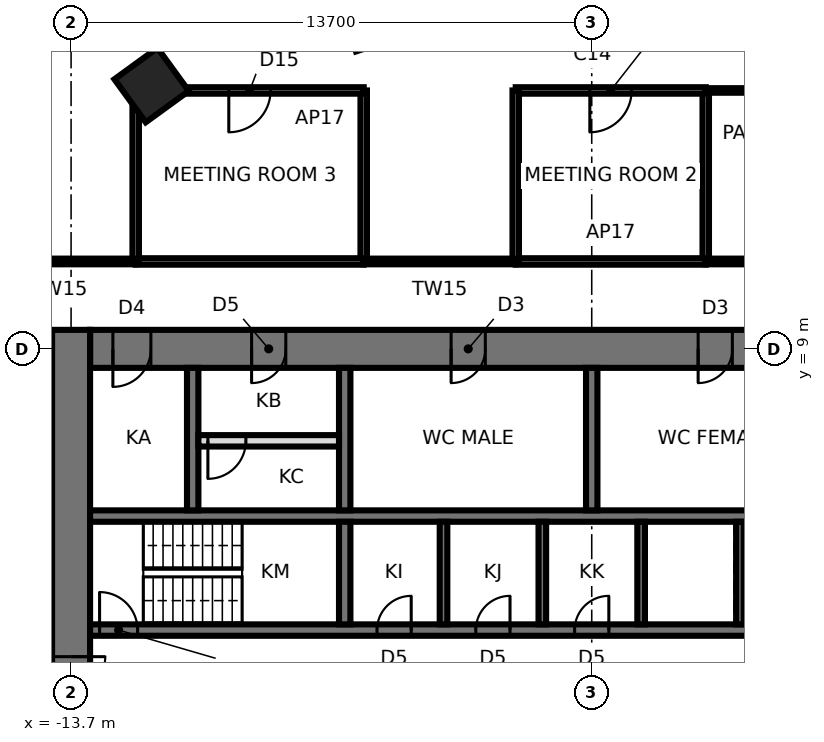
"""IFC4 building model, lengths in metres.
Left out: names, types, materials, properties, quantities, classifications, styles, units other than length and angle.
Written with IfcOpenShell. Run it as: python <this file> out.ifc"""

import sys

from ifc_helpers import new_model, si_unit, direction, frame, frame_2d, origin, origin_2d, place, context, subcontext, project, spatial, rectangle, extrude, element, fill, save


model = new_model("IFC4")
c1 = context("Model", 3, precision=1e-05, world=origin(), true_north=direction((0.0, 1.0)))
c2 = subcontext(c1, "Body", "Model", "MODEL_VIEW")
j1 = project(units=[si_unit("LENGTHUNIT", "METRE"), si_unit("PLANEANGLEUNIT", "RADIAN")], contexts=[c1])
p1 = place(None, origin())
s1 = spatial("IfcSite", under=j1, at=p1, CompositionType="ELEMENT")
p2 = place(p1, origin())
s2 = spatial("IfcBuilding", under=s1, at=p2, CompositionType="ELEMENT")
p3 = place(p2, frame((0.0, 0.0, 195.5)))
s3 = spatial("IfcBuildingStorey", under=s2, at=p3, CompositionType="ELEMENT", Elevation=195.5)
p4 = place(p3, frame((-11.581, 15.94, 0.0), z_axis=(0.0, 0.0, 1.0), x_axis=(-0.587785252292, 0.809016994375, 0.0)))
e1 = element("IfcColumn", 1, at=p4, inside=s3, PredefinedType="COLUMN", context=c2, shape_type="SweptSolid", body=[
    extrude(rectangle(XDim=1.4, YDim=1.4, at=origin_2d()), origin(), (0.0, 0.0, 1.0), 3.9),
])
p5 = place(p3, frame((13.2, 9.0, 0.0), z_axis=(0.0, 0.0, 1.0), x_axis=(-1.0, 0.0, 0.0)))
e2 = element("IfcWall", 2, at=p5, inside=s3, PredefinedType="SHEAR", context=c2, shape_type="SweptSolid", body=[
    extrude(rectangle(XDim=26.4, YDim=1.0, at=frame_2d((13.2, 0.0))), origin(), (0.0, 0.0, 1.0), 3.9),
])
p6 = place(p5, frame((2.65, 0.0, 0.0)))
e3 = element("IfcOpeningElement", 3, at=p6, cuts=e2, PredefinedType="OPENING", context=c2, shape_type="SweptSolid", body=[
    extrude(rectangle(XDim=0.9, YDim=2.1, at=frame_2d((0.45, 1.05))), frame((0.0, 0.51, 0.0), z_axis=(0.0, -1.0, 0.0), x_axis=(1.0, 0.0, 0.0)), (0.0, 0.0, 1.0), 1.02),
])
p7 = place(p5, frame((9.5, 0.0, 0.0)))
e4 = element("IfcOpeningElement", 4, at=p7, cuts=e2, PredefinedType="OPENING", context=c2, shape_type="SweptSolid", body=[
    extrude(rectangle(XDim=0.9, YDim=2.1, at=frame_2d((0.45, 1.05))), frame((0.0, 0.51, 0.0), z_axis=(0.0, -1.0, 0.0), x_axis=(1.0, 0.0, 0.0)), (0.0, 0.0, 1.0), 1.02),
])
p8 = place(p5, frame((16.0, 0.0, 0.0)))
e5 = element("IfcOpeningElement", 5, at=p8, cuts=e2, PredefinedType="OPENING", context=c2, shape_type="SweptSolid", body=[
    extrude(rectangle(XDim=0.9, YDim=2.1, at=frame_2d((0.45, 1.05))), frame((0.0, 0.51, 0.0), z_axis=(0.0, -1.0, 0.0), x_axis=(1.0, 0.0, 0.0)), (0.0, 0.0, 1.0), 1.02),
])
p9 = place(p5, frame((21.25, 0.0, 0.0)))
e6 = element("IfcOpeningElement", 6, at=p9, cuts=e2, PredefinedType="OPENING", context=c2, shape_type="SweptSolid", body=[
    extrude(rectangle(XDim=0.9, YDim=2.1, at=frame_2d((0.45, 1.05))), frame((0.0, 0.51, 0.0), z_axis=(0.0, -1.0, 0.0), x_axis=(1.0, 0.0, 0.0)), (0.0, 0.0, 1.0), 1.02),
])
p10 = place(p5, frame((24.8, 0.0, 0.0)))
e7 = element("IfcOpeningElement", 7, at=p10, cuts=e2, PredefinedType="OPENING", context=c2, shape_type="SweptSolid", body=[
    extrude(rectangle(XDim=1.0, YDim=2.1, at=frame_2d((0.5, 1.05))), frame((0.0, 0.51, 0.0), z_axis=(0.0, -1.0, 0.0), x_axis=(1.0, 0.0, 0.0)), (0.0, 0.0, 1.0), 1.02),
])
p11 = place(p3, frame((-13.7, 9.5, 0.0), z_axis=(0.0, 0.0, 1.0), x_axis=(0.0, -1.0, 0.0)))
e8 = element("IfcWall", 8, at=p11, inside=s3, PredefinedType="SHEAR", context=c2, shape_type="SweptSolid", body=[
    extrude(rectangle(XDim=19.0, YDim=1.0, at=frame_2d((9.5, 0.0))), origin(), (0.0, 0.0, 1.0), 3.9),
])
p12 = place(p11, frame((8.6, 0.0, 0.0)))
e9 = element("IfcOpeningElement", 9, at=p12, cuts=e8, PredefinedType="OPENING", context=c2, shape_type="SweptSolid", body=[
    extrude(rectangle(XDim=1.8, YDim=2.4, at=frame_2d((0.9, 1.2))), frame((0.0, 0.51, 0.0), z_axis=(0.0, -1.0, 0.0), x_axis=(1.0, 0.0, 0.0)), (0.0, 0.0, 1.0), 1.02),
])
p13 = place(p3, frame((-13.2, 1.6, 0.0), z_axis=(0.0, 0.0, 1.0), x_axis=(1.0, 0.0, 0.0)))
e10 = element("IfcWall", 10, at=p13, inside=s3, PredefinedType="SHEAR", context=c2, shape_type="SweptSolid", body=[
    extrude(rectangle(XDim=26.4, YDim=0.3, at=frame_2d((13.2, 0.0))), origin(), (0.0, 0.0, 1.0), 3.9),
])
p14 = place(p13, frame((0.25, 0.0, 0.0)))
e11 = element("IfcOpeningElement", 11, at=p14, cuts=e10, PredefinedType="OPENING", context=c2, shape_type="SweptSolid", body=[
    extrude(rectangle(XDim=1.0, YDim=2.1, at=frame_2d((0.5, 1.05))), frame((0.0, 0.16, 0.0), z_axis=(0.0, -1.0, 0.0), x_axis=(1.0, 0.0, 0.0)), (0.0, 0.0, 1.0), 0.32),
])
p15 = place(p13, frame((23.05, 0.0, 0.0)))
e12 = element("IfcOpeningElement", 12, at=p15, cuts=e10, PredefinedType="OPENING", context=c2, shape_type="SweptSolid", body=[
    extrude(rectangle(XDim=1.1, YDim=2.3, at=frame_2d((0.55, 1.15))), frame((0.0, 0.16, 0.0), z_axis=(0.0, -1.0, 0.0), x_axis=(1.0, 0.0, 0.0)), (0.0, 0.0, 1.0), 0.32),
])
p16 = place(p13, frame((20.25, 0.0, 0.0)))
e13 = element("IfcOpeningElement", 13, at=p16, cuts=e10, PredefinedType="OPENING", context=c2, shape_type="SweptSolid", body=[
    extrude(rectangle(XDim=1.5, YDim=2.4, at=frame_2d((0.75, 1.2))), frame((0.0, 0.16, 0.0), z_axis=(0.0, -1.0, 0.0), x_axis=(1.0, 0.0, 0.0)), (0.0, 0.0, 1.0), 0.32),
])
p17 = place(p13, frame((7.55, 0.0, 0.0)))
e14 = element("IfcOpeningElement", 14, at=p17, cuts=e10, PredefinedType="OPENING", context=c2, shape_type="SweptSolid", body=[
    extrude(rectangle(XDim=0.9, YDim=2.1, at=frame_2d((0.45, 1.05))), frame((0.0, 0.16, 0.0), z_axis=(0.0, -1.0, 0.0), x_axis=(1.0, 0.0, 0.0)), (0.0, 0.0, 1.0), 0.32),
])
p18 = place(p13, frame((10.15, 0.0, 0.0)))
e15 = element("IfcOpeningElement", 15, at=p18, cuts=e10, PredefinedType="OPENING", context=c2, shape_type="SweptSolid", body=[
    extrude(rectangle(XDim=0.9, YDim=2.1, at=frame_2d((0.45, 1.05))), frame((0.0, 0.16, 0.0), z_axis=(0.0, -1.0, 0.0), x_axis=(1.0, 0.0, 0.0)), (0.0, 0.0, 1.0), 0.32),
])
p19 = place(p13, frame((12.75, 0.0, 0.0)))
e16 = element("IfcOpeningElement", 16, at=p19, cuts=e10, PredefinedType="OPENING", context=c2, shape_type="SweptSolid", body=[
    extrude(rectangle(XDim=0.9, YDim=2.1, at=frame_2d((0.45, 1.05))), frame((0.0, 0.16, 0.0), z_axis=(0.0, -1.0, 0.0), x_axis=(1.0, 0.0, 0.0)), (0.0, 0.0, 1.0), 0.32),
])
p20 = place(p13, frame((25.45, 0.0, 0.0)))
e17 = element("IfcOpeningElement", 17, at=p20, cuts=e10, PredefinedType="OPENING", context=c2, shape_type="SweptSolid", body=[
    extrude(rectangle(XDim=0.9, YDim=2.1, at=frame_2d((0.45, 1.05))), frame((0.0, 0.16, 0.0), z_axis=(0.0, -1.0, 0.0), x_axis=(1.0, 0.0, 0.0)), (0.0, 0.0, 1.0), 0.32),
])
p21 = place(p3, frame((-13.2, 4.6, 0.0), z_axis=(0.0, 0.0, 1.0), x_axis=(1.0, 0.0, 0.0)))
e18 = element("IfcWall", 18, at=p21, inside=s3, PredefinedType="SHEAR", context=c2, shape_type="SweptSolid", body=[
    extrude(rectangle(XDim=26.4, YDim=0.3, at=frame_2d((13.2, 0.0))), origin(), (0.0, 0.0, 1.0), 3.9),
])
p22 = place(p3, frame((-6.5, 1.75, 0.0), z_axis=(0.0, 0.0, 1.0), x_axis=(0.0, 1.0, 0.0)))
e19 = element("IfcWall", 19, at=p22, inside=s3, PredefinedType="SHEAR", context=c2, shape_type="SweptSolid", body=[
    extrude(rectangle(XDim=2.7, YDim=0.3, at=frame_2d((1.35, 0.0))), origin(), (0.0, 0.0, 1.0), 3.9),
])
p23 = place(p3, frame((-6.5, 4.75, 0.0), z_axis=(0.0, 0.0, 1.0), x_axis=(0.0, 1.0, 0.0)))
e20 = element("IfcWall", 20, at=p23, inside=s3, PredefinedType="SHEAR", context=c2, shape_type="SweptSolid", body=[
    extrude(rectangle(XDim=3.75, YDim=0.3, at=frame_2d((1.875, 0.0))), origin(), (0.0, 0.0, 1.0), 3.9),
])
for number, where, z_axis, x_axis in (
    (21, (-3.9, 1.75, 0.0), (0.0, 0.0, 1.0), (0.0, 1.0, 0.0)),
    (22, (-1.3, 1.75, 0.0), (0.0, 0.0, 1.0), (0.0, 1.0, 0.0)),
    (23, (1.3, 1.75, 0.0), (0.0, 0.0, 1.0), (0.0, 1.0, 0.0)),
    (24, (3.9, 1.75, 0.0), (0.0, 0.0, 1.0), (0.0, 1.0, 0.0)),
):
    element("IfcWall", number, at=place(p3, frame(where, z_axis=z_axis, x_axis=x_axis)), inside=s3, PredefinedType="SHEAR", context=c2, shape_type="SweptSolid", body=[
        extrude(rectangle(XDim=2.7, YDim=0.2, at=frame_2d((1.35, 0.0))), origin(), (0.0, 0.0, 1.0), 3.9),
    ])
for number, where, z_axis, x_axis in (
    (25, (0.0, 4.75, 0.0), (0.0, 0.0, 1.0), (0.0, 1.0, 0.0)),
    (26, (-10.5, 4.75, 0.0), (0.0, 0.0, 1.0), (0.0, 1.0, 0.0)),
):
    element("IfcWall", number, at=place(p3, frame(where, z_axis=z_axis, x_axis=x_axis)), inside=s3, PredefinedType="SHEAR", context=c2, shape_type="SweptSolid", body=[
        extrude(rectangle(XDim=3.75, YDim=0.3, at=frame_2d((1.875, 0.0))), origin(), (0.0, 0.0, 1.0), 3.9),
    ])
p24 = place(p3, frame((-10.35, 6.58, 0.0), z_axis=(0.0, 0.0, 1.0), x_axis=(1.0, 0.0, 0.0)))
e27 = element("IfcWall", 27, at=p24, inside=s3, PredefinedType="PARTITIONING", context=c2, shape_type="SweptSolid", body=[
    extrude(rectangle(XDim=3.7, YDim=0.3, at=frame_2d((1.85, 0.0))), origin(), (0.0, 0.0, 1.0), 3.74),
])
p25 = place(p24, frame((0.25, 0.0, 0.0)))
e28 = element("IfcOpeningElement", 28, at=p25, cuts=e27, PredefinedType="OPENING", context=c2, shape_type="SweptSolid", body=[
    extrude(rectangle(XDim=1.0, YDim=2.4, at=frame_2d((0.5, 1.2))), frame((0.0, 0.16, 0.0), z_axis=(0.0, -1.0, 0.0), x_axis=(1.0, 0.0, 0.0)), (0.0, 0.0, 1.0), 0.32),
])
p26 = place(p3, frame((16.0, 11.3, 0.0), z_axis=(0.0, 0.0, 1.0), x_axis=(-1.0, 0.0, 0.0)))
e29 = element("IfcWall", 29, at=p26, inside=s3, PredefinedType="PARTITIONING", context=c2, shape_type="SweptSolid", body=[
    extrude(rectangle(XDim=13.0, YDim=0.15, at=frame_2d((6.5, 0.0))), origin(), (0.0, 0.0, 1.0), 3.74),
])
p27 = place(p26, frame((4.113, 0.0, 0.0)))
e30 = element("IfcOpeningElement", 30, at=p27, cuts=e29, PredefinedType="OPENING", context=c2, shape_type="SweptSolid", body=[
    extrude(rectangle(XDim=1.2, YDim=2.4, at=frame_2d((0.6, 1.2))), frame((0.0, 0.085, 0.0), z_axis=(0.0, -1.0, 0.0), x_axis=(1.0, 0.0, 0.0)), (0.0, 0.0, 1.0), 0.17),
])
p28 = place(p3, frame((6.3, 15.8, 0.0), z_axis=(0.0, 0.0, 1.0), x_axis=(-1.0, 0.0, 0.0)))
e31 = element("IfcWall", 31, at=p28, inside=s3, PredefinedType="PARTITIONING", context=c2, shape_type="SweptSolid", body=[
    extrude(rectangle(XDim=3.3, YDim=0.12, at=frame_2d((1.65, 0.0))), origin(), (0.0, 0.0, 1.0), 3.74),
])
p29 = place(p3, frame((3.0, 15.8, 0.0), z_axis=(0.0, 0.0, 1.0), x_axis=(0.0, -1.0, 0.0)))
e32 = element("IfcWall", 32, at=p29, inside=s3, PredefinedType="PARTITIONING", context=c2, shape_type="SweptSolid", body=[
    extrude(rectangle(XDim=4.5, YDim=0.17, at=frame_2d((2.25, 0.0))), origin(), (0.0, 0.0, 1.0), 3.74),
])
p30 = place(p3, frame((-2.0, 11.3, 0.0), z_axis=(0.0, 0.0, 1.0), x_axis=(1.0, 0.0, 0.0)))
e33 = element("IfcWall", 33, at=p30, inside=s3, PredefinedType="PARTITIONING", context=c2, shape_type="SweptSolid", body=[
    extrude(rectangle(XDim=5.0, YDim=0.17, at=frame_2d((2.5, 0.0))), origin(), (0.0, 0.0, 1.0), 3.74),
])
p31 = place(p3, frame((3.0, 15.8, 0.0), z_axis=(0.0, 0.0, 1.0), x_axis=(-1.0, 0.0, 0.0)))
e34 = element("IfcWall", 34, at=p31, inside=s3, PredefinedType="PARTITIONING", context=c2, shape_type="SweptSolid", body=[
    extrude(rectangle(XDim=5.0, YDim=0.17, at=frame_2d((2.5, 0.0))), origin(), (0.0, 0.0, 1.0), 3.74),
])
p32 = place(p31, frame((1.95, 0.0, 0.0)))
e35 = element("IfcOpeningElement", 35, at=p32, cuts=e34, PredefinedType="OPENING", context=c2, shape_type="SweptSolid", body=[
    extrude(rectangle(XDim=1.1, YDim=2.4, at=frame_2d((0.55, 1.2))), frame((0.0, 0.095, 0.0), z_axis=(0.0, -1.0, 0.0), x_axis=(1.0, 0.0, 0.0)), (0.0, 0.0, 1.0), 0.19),
])
p33 = place(p3, frame((-2.0, 15.8, 0.0), z_axis=(0.0, 0.0, 1.0), x_axis=(0.0, -1.0, 0.0)))
e36 = element("IfcWall", 36, at=p33, inside=s3, PredefinedType="PARTITIONING", context=c2, shape_type="SweptSolid", body=[
    extrude(rectangle(XDim=4.5, YDim=0.17, at=frame_2d((2.25, 0.0))), origin(), (0.0, 0.0, 1.0), 3.74),
])
p34 = place(p3, frame((-2.0, 11.3, 0.0), z_axis=(0.0, 0.0, 1.0), x_axis=(-1.0, 0.0, 0.0)))
e37 = element("IfcWall", 37, at=p34, inside=s3, PredefinedType="PARTITIONING", context=c2, shape_type="SweptSolid", body=[
    extrude(rectangle(XDim=4.0, YDim=0.15, at=frame_2d((2.0, 0.0))), origin(), (0.0, 0.0, 1.0), 3.74),
])
p35 = place(p3, frame((-6.0, 11.3, 0.0), z_axis=(0.0, 0.0, 1.0), x_axis=(0.0, 1.0, 0.0)))
e38 = element("IfcWall", 38, at=p35, inside=s3, PredefinedType="PARTITIONING", context=c2, shape_type="SweptSolid", body=[
    extrude(rectangle(XDim=4.5, YDim=0.17, at=frame_2d((2.25, 0.0))), origin(), (0.0, 0.0, 1.0), 3.74),
])
p36 = place(p3, frame((-6.0, 15.8, 0.0), z_axis=(0.0, 0.0, 1.0), x_axis=(-1.0, 0.0, 0.0)))
e39 = element("IfcWall", 39, at=p36, inside=s3, PredefinedType="PARTITIONING", context=c2, shape_type="SweptSolid", body=[
    extrude(rectangle(XDim=6.0, YDim=0.17, at=frame_2d((3.0, 0.0))), origin(), (0.0, 0.0, 1.0), 3.74),
])
p37 = place(p36, frame((2.45, 0.0, 0.0)))
e40 = element("IfcOpeningElement", 40, at=p37, cuts=e39, PredefinedType="OPENING", context=c2, shape_type="SweptSolid", body=[
    extrude(rectangle(XDim=1.1, YDim=2.4, at=frame_2d((0.55, 1.2))), frame((0.0, 0.095, 0.0), z_axis=(0.0, -1.0, 0.0), x_axis=(1.0, 0.0, 0.0)), (0.0, 0.0, 1.0), 0.19),
])
p38 = place(p3, frame((-12.0, 11.3, 0.0), z_axis=(0.0, 0.0, 1.0), x_axis=(1.0, 0.0, 0.0)))
e41 = element("IfcWall", 41, at=p38, inside=s3, PredefinedType="PARTITIONING", context=c2, shape_type="SweptSolid", body=[
    extrude(rectangle(XDim=6.0, YDim=0.17, at=frame_2d((3.0, 0.0))), origin(), (0.0, 0.0, 1.0), 3.74),
])
p39 = place(p3, frame((-12.0, 15.8, 0.0), z_axis=(0.0, 0.0, 1.0), x_axis=(0.0, -1.0, 0.0)))
e42 = element("IfcWall", 42, at=p39, inside=s3, PredefinedType="PARTITIONING", context=c2, shape_type="SweptSolid", body=[
    extrude(rectangle(XDim=4.5, YDim=0.17, at=frame_2d((2.25, 0.0))), origin(), (0.0, 0.0, 1.0), 3.74),
])
p40 = place(p3, frame((-12.0, 11.3, 0.0), z_axis=(0.0, 0.0, 1.0), x_axis=(-1.0, 0.0, 0.0)))
e43 = element("IfcWall", 43, at=p40, inside=s3, PredefinedType="PARTITIONING", context=c2, shape_type="SweptSolid", body=[
    extrude(rectangle(XDim=4.0, YDim=0.15, at=frame_2d((2.0, 0.0))), origin(), (0.0, 0.0, 1.0), 3.74),
])
p41 = place(p12, origin())
e44 = element("IfcDoor", 44, at=p41, inside=s3, OperationType="DOUBLE_DOOR_SINGLE_SWING", PredefinedType="DOOR", context=c2, shape_type="SweptSolid", body=[
    extrude(rectangle(XDim=1.72, YDim=2.36, at=frame_2d((0.9, 1.18))), frame((0.0, 0.025, 0.0), z_axis=(0.0, -1.0, 0.0), x_axis=(1.0, 0.0, 0.0)), (0.0, 0.0, 1.0), 0.05),
    extrude(rectangle(XDim=0.04, YDim=2.4, at=frame_2d((0.02, 1.2))), frame((0.0, 0.25, 0.0), z_axis=(0.0, -1.0, 0.0), x_axis=(1.0, 0.0, 0.0)), (0.0, 0.0, 1.0), 0.5),
    extrude(rectangle(XDim=0.04, YDim=2.4, at=frame_2d((1.78, 1.2))), frame((0.0, 0.25, 0.0), z_axis=(0.0, -1.0, 0.0), x_axis=(1.0, 0.0, 0.0)), (0.0, 0.0, 1.0), 0.5),
    extrude(rectangle(XDim=1.72, YDim=0.04, at=frame_2d((0.9, 2.38))), frame((0.0, 0.25, 0.0), z_axis=(0.0, -1.0, 0.0), x_axis=(1.0, 0.0, 0.0)), (0.0, 0.0, 1.0), 0.5),
])
fill(e9, e44)
p42 = place(p14, origin())
e45 = element("IfcDoor", 45, at=p42, inside=s3, OperationType="SINGLE_SWING_LEFT", PredefinedType="DOOR", context=c2, shape_type="SweptSolid", body=[
    extrude(rectangle(XDim=1.0, YDim=2.1, at=frame_2d((0.5, 1.05))), frame((0.0, 0.025, 0.0), z_axis=(0.0, -1.0, 0.0), x_axis=(1.0, 0.0, 0.0)), (0.0, 0.0, 1.0), 0.05),
])
fill(e11, e45)
p43 = place(p17, origin())
e46 = element("IfcDoor", 46, at=p43, inside=s3, OperationType="SINGLE_SWING_RIGHT", PredefinedType="DOOR", context=c2, shape_type="SweptSolid", body=[
    extrude(rectangle(XDim=0.9, YDim=2.1, at=frame_2d((0.45, 1.05))), frame((0.0, 0.025, 0.0), z_axis=(0.0, -1.0, 0.0), x_axis=(1.0, 0.0, 0.0)), (0.0, 0.0, 1.0), 0.05),
])
fill(e14, e46)
p44 = place(p18, origin())
e47 = element("IfcDoor", 47, at=p44, inside=s3, OperationType="SINGLE_SWING_RIGHT", PredefinedType="DOOR", context=c2, shape_type="SweptSolid", body=[
    extrude(rectangle(XDim=0.9, YDim=2.1, at=frame_2d((0.45, 1.05))), frame((0.0, 0.025, 0.0), z_axis=(0.0, -1.0, 0.0), x_axis=(1.0, 0.0, 0.0)), (0.0, 0.0, 1.0), 0.05),
])
fill(e15, e47)
p45 = place(p19, origin())
e48 = element("IfcDoor", 48, at=p45, inside=s3, OperationType="SINGLE_SWING_RIGHT", PredefinedType="DOOR", context=c2, shape_type="SweptSolid", body=[
    extrude(rectangle(XDim=0.9, YDim=2.1, at=frame_2d((0.45, 1.05))), frame((0.0, 0.025, 0.0), z_axis=(0.0, -1.0, 0.0), x_axis=(1.0, 0.0, 0.0)), (0.0, 0.0, 1.0), 0.05),
])
fill(e16, e48)
p46 = place(p7, origin())
e49 = element("IfcDoor", 49, at=p46, inside=s3, OperationType="SINGLE_SWING_RIGHT", PredefinedType="DOOR", context=c2, shape_type="SweptSolid", body=[
    extrude(rectangle(XDim=0.82, YDim=2.06, at=frame_2d((0.45, 1.03))), frame((0.0, 0.025, 0.0), z_axis=(0.0, -1.0, 0.0), x_axis=(1.0, 0.0, 0.0)), (0.0, 0.0, 1.0), 0.05),
    extrude(rectangle(XDim=0.04, YDim=2.1, at=frame_2d((0.02, 1.05))), frame((0.0, 0.25, 0.0), z_axis=(0.0, -1.0, 0.0), x_axis=(1.0, 0.0, 0.0)), (0.0, 0.0, 1.0), 0.5),
    extrude(rectangle(XDim=0.04, YDim=2.1, at=frame_2d((0.88, 1.05))), frame((0.0, 0.25, 0.0), z_axis=(0.0, -1.0, 0.0), x_axis=(1.0, 0.0, 0.0)), (0.0, 0.0, 1.0), 0.5),
    extrude(rectangle(XDim=0.82, YDim=0.04, at=frame_2d((0.45, 2.08))), frame((0.0, 0.25, 0.0), z_axis=(0.0, -1.0, 0.0), x_axis=(1.0, 0.0, 0.0)), (0.0, 0.0, 1.0), 0.5),
])
fill(e4, e49)
p47 = place(p8, origin())
e50 = element("IfcDoor", 50, at=p47, inside=s3, OperationType="SINGLE_SWING_RIGHT", PredefinedType="DOOR", context=c2, shape_type="SweptSolid", body=[
    extrude(rectangle(XDim=0.82, YDim=2.06, at=frame_2d((0.45, 1.03))), frame((0.0, 0.025, 0.0), z_axis=(0.0, -1.0, 0.0), x_axis=(1.0, 0.0, 0.0)), (0.0, 0.0, 1.0), 0.05),
    extrude(rectangle(XDim=0.04, YDim=2.1, at=frame_2d((0.02, 1.05))), frame((0.0, 0.25, 0.0), z_axis=(0.0, -1.0, 0.0), x_axis=(1.0, 0.0, 0.0)), (0.0, 0.0, 1.0), 0.5),
    extrude(rectangle(XDim=0.04, YDim=2.1, at=frame_2d((0.88, 1.05))), frame((0.0, 0.25, 0.0), z_axis=(0.0, -1.0, 0.0), x_axis=(1.0, 0.0, 0.0)), (0.0, 0.0, 1.0), 0.5),
    extrude(rectangle(XDim=0.82, YDim=0.04, at=frame_2d((0.45, 2.08))), frame((0.0, 0.25, 0.0), z_axis=(0.0, -1.0, 0.0), x_axis=(1.0, 0.0, 0.0)), (0.0, 0.0, 1.0), 0.5),
])
fill(e5, e50)
p48 = place(p9, origin())
e51 = element("IfcDoor", 51, at=p48, inside=s3, OperationType="SINGLE_SWING_RIGHT", PredefinedType="DOOR", context=c2, shape_type="SweptSolid", body=[
    extrude(rectangle(XDim=0.82, YDim=2.06, at=frame_2d((0.45, 1.03))), frame((0.0, 0.025, 0.0), z_axis=(0.0, -1.0, 0.0), x_axis=(1.0, 0.0, 0.0)), (0.0, 0.0, 1.0), 0.05),
    extrude(rectangle(XDim=0.04, YDim=2.1, at=frame_2d((0.02, 1.05))), frame((0.0, 0.25, 0.0), z_axis=(0.0, -1.0, 0.0), x_axis=(1.0, 0.0, 0.0)), (0.0, 0.0, 1.0), 0.5),
    extrude(rectangle(XDim=0.04, YDim=2.1, at=frame_2d((0.88, 1.05))), frame((0.0, 0.25, 0.0), z_axis=(0.0, -1.0, 0.0), x_axis=(1.0, 0.0, 0.0)), (0.0, 0.0, 1.0), 0.5),
    extrude(rectangle(XDim=0.82, YDim=0.04, at=frame_2d((0.45, 2.08))), frame((0.0, 0.25, 0.0), z_axis=(0.0, -1.0, 0.0), x_axis=(1.0, 0.0, 0.0)), (0.0, 0.0, 1.0), 0.5),
])
fill(e6, e51)
p49 = place(p10, origin())
e52 = element("IfcDoor", 52, at=p49, inside=s3, OperationType="SINGLE_SWING_RIGHT", PredefinedType="DOOR", context=c2, shape_type="SweptSolid", body=[
    extrude(rectangle(XDim=0.92, YDim=2.06, at=frame_2d((0.5, 1.03))), frame((0.0, 0.025, 0.0), z_axis=(0.0, -1.0, 0.0), x_axis=(1.0, 0.0, 0.0)), (0.0, 0.0, 1.0), 0.05),
    extrude(rectangle(XDim=0.04, YDim=2.1, at=frame_2d((0.02, 1.05))), frame((0.0, 0.25, 0.0), z_axis=(0.0, -1.0, 0.0), x_axis=(1.0, 0.0, 0.0)), (0.0, 0.0, 1.0), 0.5),
    extrude(rectangle(XDim=0.04, YDim=2.1, at=frame_2d((0.98, 1.05))), frame((0.0, 0.25, 0.0), z_axis=(0.0, -1.0, 0.0), x_axis=(1.0, 0.0, 0.0)), (0.0, 0.0, 1.0), 0.5),
    extrude(rectangle(XDim=0.92, YDim=0.04, at=frame_2d((0.5, 2.08))), frame((0.0, 0.25, 0.0), z_axis=(0.0, -1.0, 0.0), x_axis=(1.0, 0.0, 0.0)), (0.0, 0.0, 1.0), 0.5),
])
fill(e7, e52)
p50 = place(p25, frame((1.0, 0.0, 0.0), z_axis=(0.0, 0.0, 1.0), x_axis=(-1.0, 0.0, 0.0)))
e53 = element("IfcDoor", 53, at=p50, inside=s3, OperationType="SINGLE_SWING_RIGHT", PredefinedType="DOOR", context=c2, shape_type="SweptSolid", body=[
    extrude(rectangle(XDim=1.0, YDim=2.4, at=frame_2d((0.5, 1.2))), frame((0.0, 0.025, 0.0), z_axis=(0.0, -1.0, 0.0), x_axis=(1.0, 0.0, 0.0)), (0.0, 0.0, 1.0), 0.05),
])
fill(e28, e53)
p51 = place(p32, origin())
e54 = element("IfcDoor", 54, at=p51, inside=s3, OperationType="SINGLE_SWING_RIGHT", PredefinedType="DOOR", context=c2, shape_type="SweptSolid", body=[
    extrude(rectangle(XDim=1.1, YDim=2.4, at=frame_2d((0.55, 1.2))), frame((0.0, 0.025, 0.0), z_axis=(0.0, -1.0, 0.0), x_axis=(1.0, 0.0, 0.0)), (0.0, 0.0, 1.0), 0.05),
])
fill(e35, e54)
p52 = place(p37, origin())
e55 = element("IfcDoor", 55, at=p52, inside=s3, OperationType="SINGLE_SWING_RIGHT", PredefinedType="DOOR", context=c2, shape_type="SweptSolid", body=[
    extrude(rectangle(XDim=1.1, YDim=2.4, at=frame_2d((0.55, 1.2))), frame((0.0, 0.025, 0.0), z_axis=(0.0, -1.0, 0.0), x_axis=(1.0, 0.0, 0.0)), (0.0, 0.0, 1.0), 0.05),
])
fill(e40, e55)
save(model, sys.argv[1])
